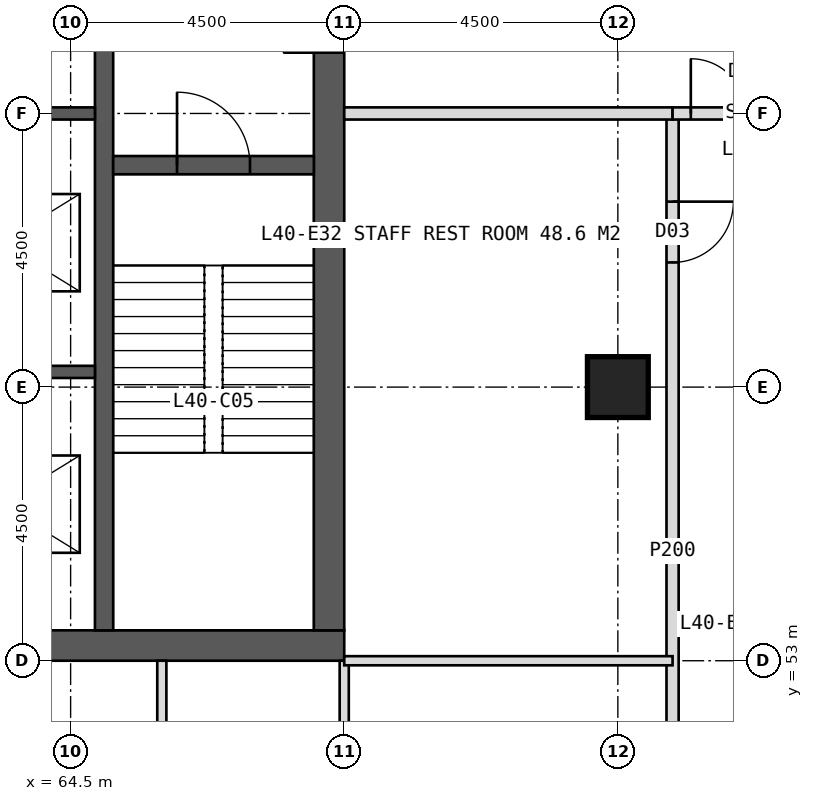
"""IFC4 building model, lengths in metres.
Left out: names, types, materials, properties, quantities, classifications, styles, units other than length and angle.
Written with IfcOpenShell. Run it as: python <this file> out.ifc"""

import sys

from ifc_helpers import new_model, si_unit, direction, frame, frame_2d, origin, origin_2d, place, context, subcontext, project, spatial, rectangle, hollow_rectangle, extrude, element, fill, save


model = new_model("IFC4")
c1 = context("Model", 3, precision=1e-05, world=origin(), true_north=direction((0.0, 1.0)))
c2 = subcontext(c1, "Body", "Model", "MODEL_VIEW")
j1 = project(units=[si_unit("LENGTHUNIT", "METRE"), si_unit("PLANEANGLEUNIT", "RADIAN")], contexts=[c1])
p1 = place(None, origin())
s1 = spatial("IfcSite", under=j1, at=p1, CompositionType="ELEMENT")
p2 = place(p1, origin())
s2 = spatial("IfcBuilding", under=s1, at=p2, CompositionType="ELEMENT")
p3 = place(p2, frame((0.0, 0.0, 168.0)))
s3 = spatial("IfcBuildingStorey", under=s2, at=p3, CompositionType="ELEMENT", Elevation=168.0)
p4 = place(p3, frame((51.0, 53.25, 0.0), z_axis=(0.0, 0.0, 1.0), x_axis=(1.0, 0.0, 0.0)))
e1 = element("IfcWall", 1, at=p4, inside=s3, PredefinedType="SHEAR", context=c2, shape_type="SweptSolid", body=[
    extrude(rectangle(XDim=18.0, YDim=0.5, at=frame_2d((9.0, 0.0))), origin(), (0.0, 0.0, 1.0), 4.0),
])
p5 = place(p4, frame((8.1, 0.0, 0.0)))
e2 = element("IfcOpeningElement", 2, at=p5, cuts=e1, PredefinedType="OPENING", context=c2, shape_type="SweptSolid", body=[
    extrude(rectangle(XDim=1.8, YDim=2.2, at=frame_2d((0.9, 1.1))), frame((0.0, 0.26, 0.0), z_axis=(0.0, -1.0, 0.0), x_axis=(1.0, 0.0, 0.0)), (0.0, 0.0, 1.0), 0.52),
])
p6 = place(p3, frame((68.75, 53.5, 0.0), z_axis=(0.0, 0.0, 1.0), x_axis=(0.0, 1.0, 0.0)))
e3 = element("IfcWall", 3, at=p6, inside=s3, PredefinedType="SHEAR", context=c2, shape_type="SweptSolid", body=[
    extrude(rectangle(XDim=17.0, YDim=0.5, at=frame_2d((8.5, 0.0))), origin(), (0.0, 0.0, 1.0), 4.0),
])
p7 = place(p6, frame((9.5, 0.0, 0.0)))
e4 = element("IfcOpeningElement", 4, at=p7, cuts=e3, PredefinedType="OPENING", context=c2, shape_type="SweptSolid", body=[
    extrude(rectangle(XDim=1.5, YDim=2.2, at=frame_2d((0.75, 1.1))), frame((0.0, 0.26, 0.0), z_axis=(0.0, -1.0, 0.0), x_axis=(1.0, 0.0, 0.0)), (0.0, 0.0, 1.0), 0.52),
])
p8 = place(p3, frame((65.05, 53.5, 0.0), z_axis=(0.0, 0.0, 1.0), x_axis=(0.0, 1.0, 0.0)))
e5 = element("IfcWall", 5, at=p8, inside=s3, PredefinedType="SHEAR", context=c2, shape_type="SweptSolid", body=[
    extrude(rectangle(XDim=17.0, YDim=0.3, at=frame_2d((8.5, 0.0))), origin(), (0.0, 0.0, 1.0), 4.0),
])
for number, where, z_axis, x_axis in (
    (6, (61.85, 57.75, 0.0), (0.0, 0.0, 1.0), (1.0, 0.0, 0.0)),
    (7, (61.85, 62.0, 0.0), (0.0, 0.0, 1.0), (1.0, 0.0, 0.0)),
):
    element("IfcWall", number, at=place(p3, frame(where, z_axis=z_axis, x_axis=x_axis)), inside=s3, PredefinedType="SHEAR", context=c2, shape_type="SweptSolid", body=[
        extrude(rectangle(XDim=3.05, YDim=0.2, at=frame_2d((1.525, 0.0))), origin(), (0.0, 0.0, 1.0), 4.0),
    ])
p9 = place(p3, frame((65.2, 61.15, 0.0), z_axis=(0.0, 0.0, 1.0), x_axis=(1.0, 0.0, 0.0)))
e8 = element("IfcWall", 8, at=p9, inside=s3, PredefinedType="SHEAR", context=c2, shape_type="SweptSolid", body=[
    extrude(rectangle(XDim=3.3, YDim=0.3, at=frame_2d((1.65, 0.0))), origin(), (0.0, 0.0, 1.0), 4.0),
])
p10 = place(p9, frame((1.05, 0.0, 0.0)))
e9 = element("IfcOpeningElement", 9, at=p10, cuts=e8, PredefinedType="OPENING", context=c2, shape_type="SweptSolid", body=[
    extrude(rectangle(XDim=1.2, YDim=2.1, at=frame_2d((0.6, 1.05))), frame((0.0, 0.16, 0.0), z_axis=(0.0, -1.0, 0.0), x_axis=(1.0, 0.0, 0.0)), (0.0, 0.0, 1.0), 0.32),
])
p11 = place(p3, frame((73.5, 57.5, 0.0), z_axis=(0.0, 0.0, 1.0), x_axis=(1.0, 0.0, 0.0)))
e10 = element("IfcColumn", 10, at=p11, inside=s3, PredefinedType="COLUMN", context=c2, shape_type="SweptSolid", body=[
    extrude(hollow_rectangle(XDim=1.0, YDim=1.0, WallThickness=0.1, at=origin_2d()), origin(), (0.0, 0.0, 1.0), 4.0),
])
for number, where, z_axis, x_axis in (
    (11, (69.0, 53.0, 0.0), (0.0, 0.0, 1.0), (0.0, -1.0, 0.0)),
    (12, (66.0, 53.0, 0.0), (0.0, 0.0, 1.0), (0.0, -1.0, 0.0)),
):
    element("IfcWall", number, at=place(p3, frame(where, z_axis=z_axis, x_axis=x_axis)), inside=s3, PredefinedType="PARTITIONING", context=c2, shape_type="SweptSolid", body=[
        extrude(rectangle(XDim=5.4, YDim=0.15, at=frame_2d((2.7, 0.0))), origin(), (0.0, 0.0, 1.0), 3.75),
    ])
p12 = place(p3, frame((74.4, 62.0, 0.0), z_axis=(0.0, 0.0, 1.0), x_axis=(0.0, -1.0, 0.0)))
e13 = element("IfcWall", 13, at=p12, inside=s3, PredefinedType="PARTITIONING", context=c2, shape_type="SweptSolid", body=[
    extrude(rectangle(XDim=14.4, YDim=0.2, at=frame_2d((7.2, 0.0))), origin(), (0.0, 0.0, 1.0), 3.75),
])
p13 = place(p12, frame((1.45, 0.0, 0.0)))
e14 = element("IfcOpeningElement", 14, at=p13, cuts=e13, PredefinedType="OPENING", context=c2, shape_type="SweptSolid", body=[
    extrude(rectangle(XDim=1.0, YDim=2.1, at=frame_2d((0.5, 1.05))), frame((0.0, 0.11, 0.0), z_axis=(0.0, -1.0, 0.0), x_axis=(1.0, 0.0, 0.0)), (0.0, 0.0, 1.0), 0.22),
])
p14 = place(p12, frame((11.2, 0.0, 0.0)))
e15 = element("IfcOpeningElement", 15, at=p14, cuts=e13, PredefinedType="OPENING", context=c2, shape_type="SweptSolid", body=[
    extrude(rectangle(XDim=1.0, YDim=2.1, at=frame_2d((0.5, 1.05))), frame((0.0, 0.11, 0.0), z_axis=(0.0, -1.0, 0.0), x_axis=(1.0, 0.0, 0.0)), (0.0, 0.0, 1.0), 0.22),
])
p15 = place(p3, frame((69.0, 62.0, 0.0), z_axis=(0.0, 0.0, 1.0), x_axis=(1.0, 0.0, 0.0)))
e16 = element("IfcWall", 16, at=p15, inside=s3, PredefinedType="SOLIDWALL", context=c2, shape_type="SweptSolid", body=[
    extrude(rectangle(XDim=5.4, YDim=0.2, at=frame_2d((2.7, 0.0))), origin(), (0.0, 0.0, 1.0), 2.95),
])
p16 = place(p3, frame((69.0, 53.0, 0.0), z_axis=(0.0, 0.0, 1.0), x_axis=(1.0, 0.0, 0.0)))
e17 = element("IfcWall", 17, at=p16, inside=s3, PredefinedType="PARTITIONING", context=c2, shape_type="SweptSolid", body=[
    extrude(rectangle(XDim=5.4, YDim=0.15, at=frame_2d((2.7, 0.0))), origin(), (0.0, 0.0, 1.0), 3.75),
])
p17 = place(p3, frame((74.4, 62.0, 0.0), z_axis=(0.0, 0.0, 1.0), x_axis=(1.0, 0.0, 0.0)))
e18 = element("IfcWall", 18, at=p17, inside=s3, PredefinedType="SOLIDWALL", context=c2, shape_type="SweptSolid", body=[
    extrude(rectangle(XDim=2.7, YDim=0.2, at=frame_2d((1.35, 0.0))), origin(), (0.0, 0.0, 1.0), 2.95),
])
p18 = place(p17, frame((0.3, 0.0, 0.0)))
e19 = element("IfcOpeningElement", 19, at=p18, cuts=e18, PredefinedType="OPENING", context=c2, shape_type="SweptSolid", body=[
    extrude(rectangle(XDim=1.8, YDim=2.2, at=frame_2d((0.9, 1.1))), frame((0.0, 0.11, 0.0), z_axis=(0.0, -1.0, 0.0), x_axis=(1.0, 0.0, 0.0)), (0.0, 0.0, 1.0), 0.22),
])
p19 = place(p13, origin())
e20 = element("IfcDoor", 20, at=p19, inside=s3, OperationType="SINGLE_SWING_LEFT", PredefinedType="DOOR", context=c2, shape_type="SweptSolid", body=[
    extrude(rectangle(XDim=1.0, YDim=2.1, at=frame_2d((0.5, 1.05))), frame((0.0, 0.025, 0.0), z_axis=(0.0, -1.0, 0.0), x_axis=(1.0, 0.0, 0.0)), (0.0, 0.0, 1.0), 0.05),
])
fill(e14, e20)
p20 = place(p18, origin())
e21 = element("IfcDoor", 21, at=p20, inside=s3, OperationType="DOUBLE_DOOR_DOUBLE_SWING", PredefinedType="DOOR", context=c2, shape_type="SweptSolid", body=[
    extrude(rectangle(XDim=1.8, YDim=2.2, at=frame_2d((0.9, 1.1))), frame((0.0, 0.025, 0.0), z_axis=(0.0, -1.0, 0.0), x_axis=(1.0, 0.0, 0.0)), (0.0, 0.0, 1.0), 0.05),
])
fill(e19, e21)
p21 = place(p10, origin())
e22 = element("IfcDoor", 22, at=p21, inside=s3, OperationType="SINGLE_SWING_LEFT", PredefinedType="DOOR", context=c2, shape_type="SweptSolid", body=[
    extrude(rectangle(XDim=1.2, YDim=2.1, at=frame_2d((0.6, 1.05))), frame((0.0, 0.025, 0.0), z_axis=(0.0, -1.0, 0.0), x_axis=(1.0, 0.0, 0.0)), (0.0, 0.0, 1.0), 0.05),
])
fill(e9, e22)
save(model, sys.argv[1])
